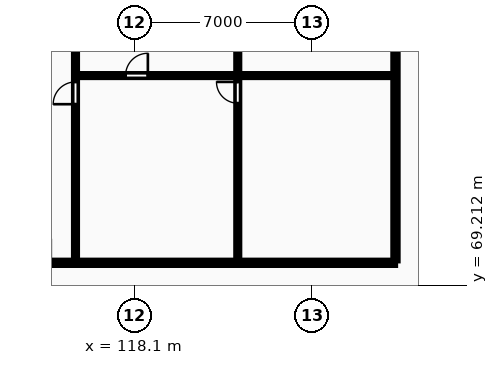
"""IFC4 building model, lengths in metres.
Left out: names, types, materials, properties, quantities, classifications, styles, units other than length and angle.
Written with IfcOpenShell. Run it as: python <this file> out.ifc"""

import sys

from ifc_helpers import new_model, si_unit, direction, frame, frame_2d, origin, place, context, subcontext, project, spatial, rectangle, extrude, element, fill, save


model = new_model("IFC4")
c1 = context("Model", 3, precision=1e-05, world=origin(), true_north=direction((0.0, 1.0)))
c2 = subcontext(c1, "Body", "Model", "MODEL_VIEW")
j1 = project(units=[si_unit("LENGTHUNIT", "METRE"), si_unit("PLANEANGLEUNIT", "RADIAN")], contexts=[c1])
p1 = place(None, origin())
s1 = spatial("IfcSite", under=j1, at=p1, CompositionType="ELEMENT")
p2 = place(p1, origin())
s2 = spatial("IfcBuilding", under=s1, at=p2, CompositionType="ELEMENT")
p3 = place(p2, frame((0.0, 0.0, 210.85)))
s3 = spatial("IfcBuildingStorey", under=s2, at=p3, CompositionType="ELEMENT", Elevation=210.85)
p4 = place(p3, frame((128.4, 70.18, 0.0), z_axis=(0.0, 0.0, 1.0), x_axis=(0.0, 1.0, 0.0)))
e1 = element("IfcWall", 1, at=p4, inside=s3, PredefinedType="PARTITIONING", context=c2, shape_type="SweptSolid", body=[
    extrude(rectangle(XDim=24.32, YDim=0.2, at=frame_2d((12.16, 0.0))), origin(), (0.0, 0.0, 1.0), 2.277),
])
p5 = place(p3, frame((122.175, 70.16, 0.0), z_axis=(0.0, 0.0, 1.0), x_axis=(0.0, 1.0, 0.0)))
e2 = element("IfcWall", 2, at=p5, inside=s3, PredefinedType="PARTITIONING", context=c2, shape_type="SweptSolid", body=[
    extrude(rectangle(XDim=14.3, YDim=0.15, at=frame_2d((7.15, 0.0))), origin(), (0.0, 0.0, 1.0), 2.97),
])
p6 = place(p5, frame((6.24, 0.0, 0.0)))
e3 = element("IfcOpeningElement", 3, at=p6, cuts=e2, PredefinedType="OPENING", context=c2, shape_type="SweptSolid", body=[
    extrude(rectangle(XDim=0.84, YDim=2.04, at=frame_2d((0.42, 1.02))), frame((0.0, 0.085, 0.0), z_axis=(0.0, -1.0, 0.0), x_axis=(1.0, 0.0, 0.0)), (0.0, 0.0, 1.0), 0.17),
])
p7 = place(p5, frame((11.094, 0.0, 0.0)))
e4 = element("IfcOpeningElement", 4, at=p7, cuts=e2, PredefinedType="OPENING", context=c2, shape_type="SweptSolid", body=[
    extrude(rectangle(XDim=0.88, YDim=2.06, at=frame_2d((0.44, 1.03))), frame((0.0, 0.085, 0.0), z_axis=(0.0, -1.0, 0.0), x_axis=(1.0, 0.0, 0.0)), (0.0, 0.0, 1.0), 0.17),
])
p8 = place(p3, frame((115.83, 77.49, 0.0), z_axis=(0.0, 0.0, 1.0), x_axis=(1.0, 0.0, 0.0)))
e5 = element("IfcWall", 5, at=p8, inside=s3, PredefinedType="PARTITIONING", context=c2, shape_type="SweptSolid", body=[
    extrude(rectangle(XDim=12.49, YDim=0.15, at=frame_2d((6.245, 0.0))), origin(), (0.0, 0.0, 1.0), 2.97),
])
p9 = place(p8, frame((1.917, 0.0, 0.0)))
e6 = element("IfcOpeningElement", 6, at=p9, cuts=e5, PredefinedType="OPENING", context=c2, shape_type="SweptSolid", body=[
    extrude(rectangle(XDim=0.88, YDim=2.06, at=frame_2d((0.44, 1.03))), frame((0.0, 0.085, 0.0), z_axis=(0.0, -1.0, 0.0), x_axis=(1.0, 0.0, 0.0)), (0.0, 0.0, 1.0), 0.17),
])
p10 = place(p3, frame((115.77, 70.16, 0.0), z_axis=(0.0, 0.0, 1.0), x_axis=(0.0, 1.0, 0.0)))
e7 = element("IfcWall", 7, at=p10, inside=s3, PredefinedType="PARTITIONING", context=c2, shape_type="SweptSolid", body=[
    extrude(rectangle(XDim=14.3, YDim=0.15, at=frame_2d((7.15, 0.0))), origin(), (0.0, 0.0, 1.0), 2.97),
])
p11 = place(p10, frame((6.2, 0.0, 0.0)))
e8 = element("IfcOpeningElement", 8, at=p11, cuts=e7, PredefinedType="OPENING", context=c2, shape_type="SweptSolid", body=[
    extrude(rectangle(XDim=0.88, YDim=2.06, at=frame_2d((0.44, 1.03))), frame((0.0, 0.085, 0.0), z_axis=(0.0, -1.0, 0.0), x_axis=(1.0, 0.0, 0.0)), (0.0, 0.0, 1.0), 0.17),
])
p12 = place(p3, frame((59.8, 70.1, 0.0), z_axis=(0.0, 0.0, 1.0), x_axis=(1.0, 0.0, 0.0)))
e9 = element("IfcWall", 9, at=p12, inside=s3, PredefinedType="PARTITIONING", context=c2, shape_type="SweptSolid", body=[
    extrude(rectangle(XDim=68.6, YDim=0.2, at=frame_2d((34.3, 0.0))), origin(), (0.0, 0.0, 1.0), 2.97),
])
p13 = place(p12, frame((2.045, 0.0, 0.0)))
e10 = element("IfcOpeningElement", 10, at=p13, cuts=e9, PredefinedType="OPENING", context=c2, shape_type="SweptSolid", body=[
    extrude(rectangle(XDim=0.95, YDim=2.15, at=frame_2d((0.475, 1.075))), frame((0.0, 0.11, 0.0), z_axis=(0.0, -1.0, 0.0), x_axis=(1.0, 0.0, 0.0)), (0.0, 0.0, 1.0), 0.22),
])
p14 = place(p12, frame((14.981, 0.0, 0.0)))
e11 = element("IfcOpeningElement", 11, at=p14, cuts=e9, PredefinedType="OPENING", context=c2, shape_type="SweptSolid", body=[
    extrude(rectangle(XDim=0.95, YDim=2.15, at=frame_2d((0.475, 1.075))), frame((0.0, 0.11, 0.0), z_axis=(0.0, -1.0, 0.0), x_axis=(1.0, 0.0, 0.0)), (0.0, 0.0, 1.0), 0.22),
])
p15 = place(p12, frame((28.045, 0.0, 0.0)))
e12 = element("IfcOpeningElement", 12, at=p15, cuts=e9, PredefinedType="OPENING", context=c2, shape_type="SweptSolid", body=[
    extrude(rectangle(XDim=0.95, YDim=2.15, at=frame_2d((0.475, 1.075))), frame((0.0, 0.11, 0.0), z_axis=(0.0, -1.0, 0.0), x_axis=(1.0, 0.0, 0.0)), (0.0, 0.0, 1.0), 0.22),
])
p16 = place(p12, frame((40.981, 0.0, 0.0)))
e13 = element("IfcOpeningElement", 13, at=p16, cuts=e9, PredefinedType="OPENING", context=c2, shape_type="SweptSolid", body=[
    extrude(rectangle(XDim=0.95, YDim=2.15, at=frame_2d((0.475, 1.075))), frame((0.0, 0.11, 0.0), z_axis=(0.0, -1.0, 0.0), x_axis=(1.0, 0.0, 0.0)), (0.0, 0.0, 1.0), 0.22),
])
p17 = place(p12, frame((54.045, 0.0, 0.0)))
e14 = element("IfcOpeningElement", 14, at=p17, cuts=e9, PredefinedType="OPENING", context=c2, shape_type="SweptSolid", body=[
    extrude(rectangle(XDim=0.95, YDim=2.15, at=frame_2d((0.475, 1.075))), frame((0.0, 0.11, 0.0), z_axis=(0.0, -1.0, 0.0), x_axis=(1.0, 0.0, 0.0)), (0.0, 0.0, 1.0), 0.22),
])
p18 = place(p6, origin())
e15 = element("IfcDoor", 15, at=p18, inside=s3, OperationType="SINGLE_SWING_RIGHT", PredefinedType="DOOR", context=c2, shape_type="SweptSolid", body=[
    extrude(rectangle(XDim=0.84, YDim=2.04, at=frame_2d((0.42, 1.02))), frame((0.0, 0.025, 0.0), z_axis=(0.0, -1.0, 0.0), x_axis=(1.0, 0.0, 0.0)), (0.0, 0.0, 1.0), 0.05),
])
fill(e3, e15)
p19 = place(p9, origin())
e16 = element("IfcDoor", 16, at=p19, inside=s3, OperationType="SINGLE_SWING_RIGHT", PredefinedType="DOOR", context=c2, shape_type="SweptSolid", body=[
    extrude(rectangle(XDim=0.88, YDim=2.06, at=frame_2d((0.44, 1.03))), frame((0.0, 0.025, 0.0), z_axis=(0.0, -1.0, 0.0), x_axis=(1.0, 0.0, 0.0)), (0.0, 0.0, 1.0), 0.05),
])
fill(e6, e16)
p20 = place(p11, origin())
e17 = element("IfcDoor", 17, at=p20, inside=s3, OperationType="SINGLE_SWING_LEFT", PredefinedType="DOOR", context=c2, shape_type="SweptSolid", body=[
    extrude(rectangle(XDim=0.88, YDim=2.06, at=frame_2d((0.44, 1.03))), frame((0.0, 0.025, 0.0), z_axis=(0.0, -1.0, 0.0), x_axis=(1.0, 0.0, 0.0)), (0.0, 0.0, 1.0), 0.05),
])
fill(e8, e17)
save(model, sys.argv[1])
